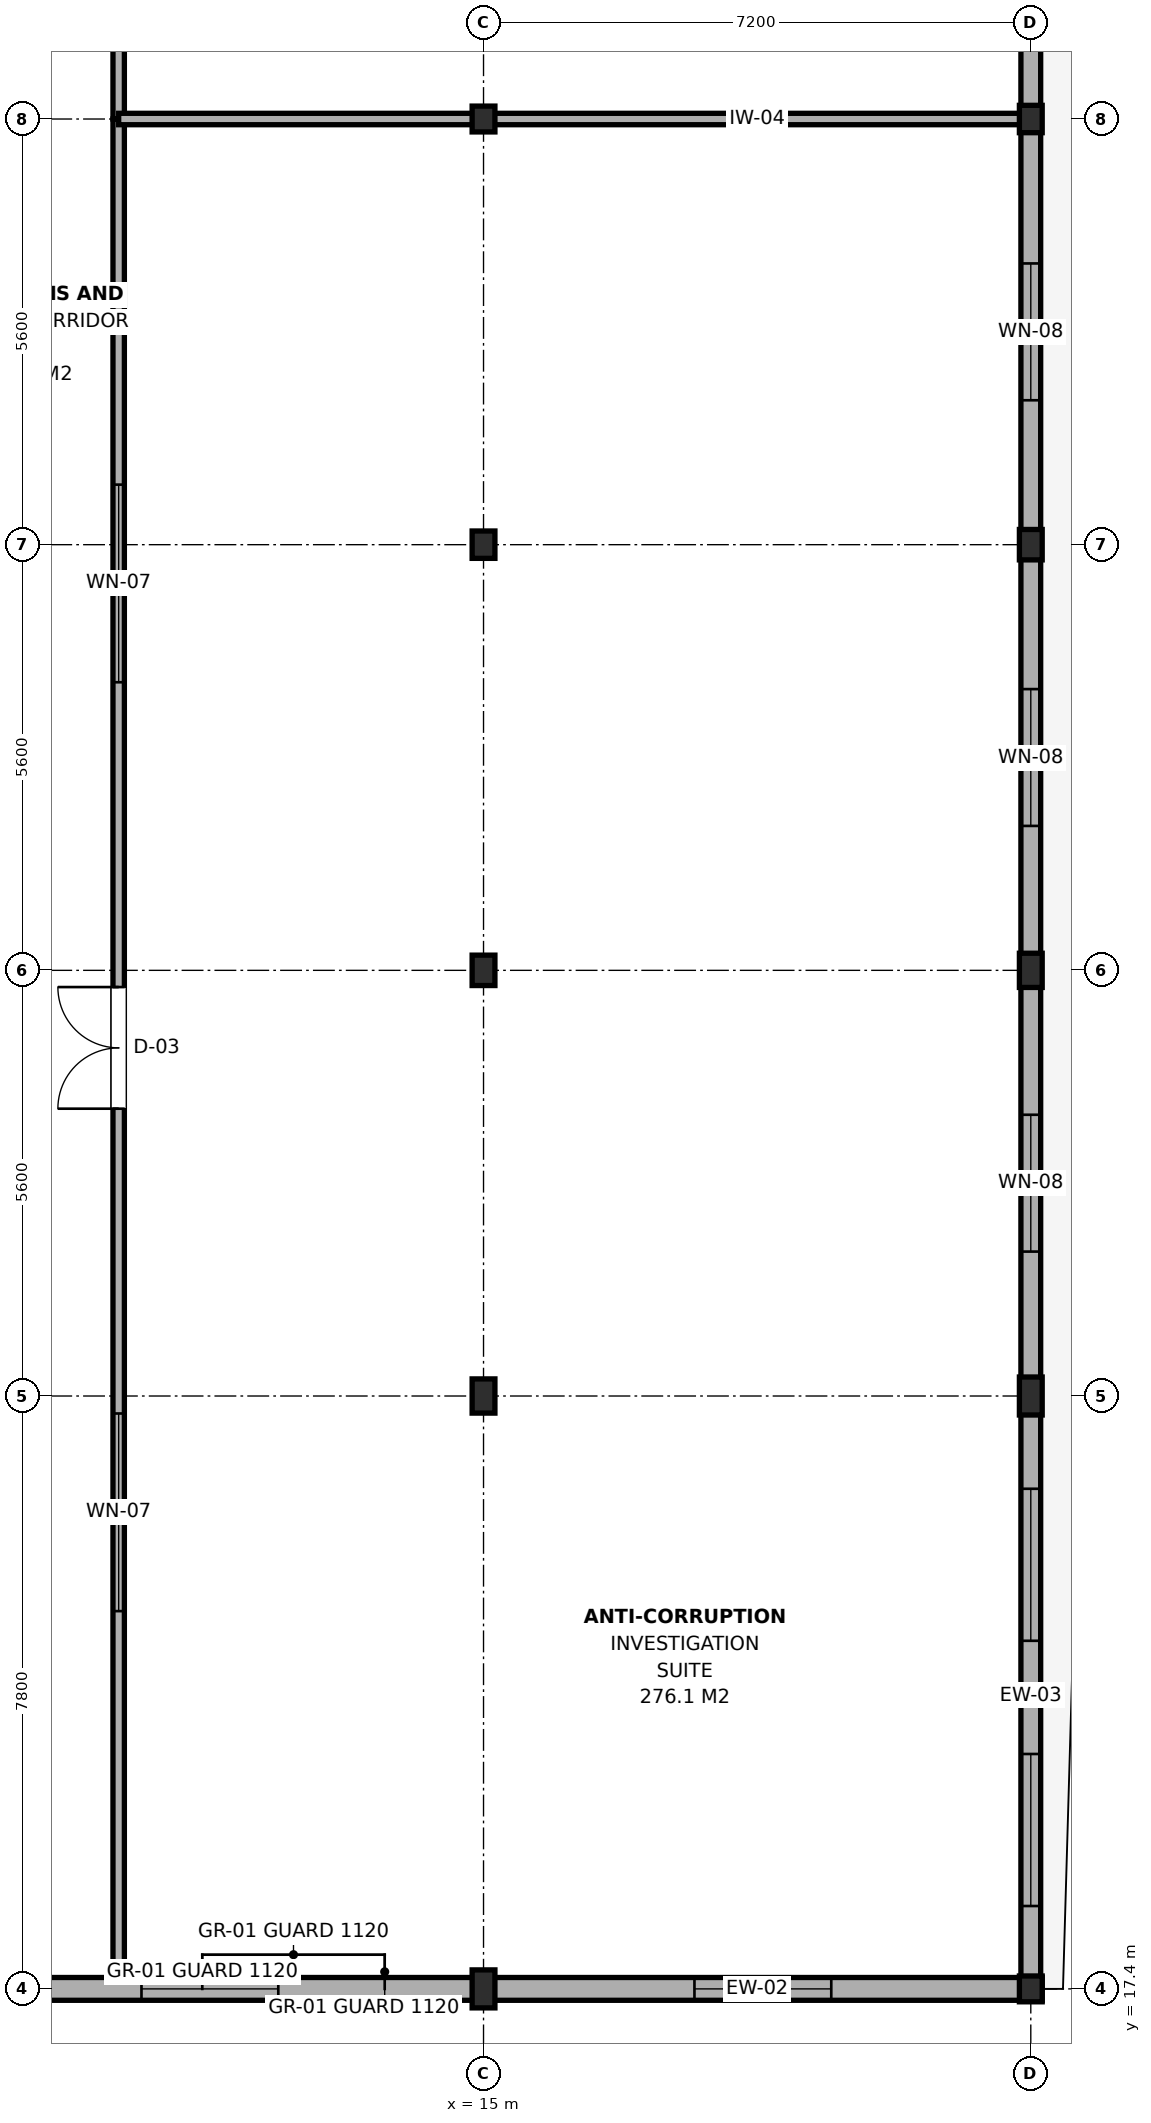
"""IFC4 building model, lengths in metres.
Left out: names, types, materials, properties, quantities, classifications, styles, units other than length and angle.
Written with IfcOpenShell. Run it as: python <this file> out.ifc"""

import sys

from ifc_helpers import new_model, si_unit, direction, frame, frame_2d, origin, origin_2d, place, context, subcontext, project, spatial, rectangle, i_section, extrude, element, fill, save


model = new_model("IFC4")
c1 = context("Model", 3, precision=1e-05, world=origin(), true_north=direction((0.0, 1.0)))
c2 = subcontext(c1, "Body", "Model", "MODEL_VIEW")
j1 = project(units=[si_unit("LENGTHUNIT", "METRE"), si_unit("PLANEANGLEUNIT", "RADIAN")], contexts=[c1])
p1 = place(None, origin())
s1 = spatial("IfcSite", under=j1, at=p1, CompositionType="ELEMENT")
p2 = place(p1, origin())
s2 = spatial("IfcBuilding", under=s1, at=p2, CompositionType="ELEMENT")
p3 = place(p2, frame((0.0, 0.0, 17.1)))
s3 = spatial("IfcBuildingStorey", under=s2, at=p3, CompositionType="ELEMENT", Elevation=17.1)
p4 = place(p3, frame((15.0, 17.4, 0.0), z_axis=(0.0, 0.0, 1.0), x_axis=(1.0, 0.0, 0.0)))
e1 = element("IfcColumn", 1, at=p4, inside=s3, PredefinedType="COLUMN", context=c2, shape_type="SweptSolid", body=[
    extrude(i_section(OverallWidth=0.3, OverallDepth=0.5, WebThickness=0.014, FlangeThickness=0.028, FilletRadius=0.027, at=origin_2d()), origin(), (0.0, 0.0, 1.0), 3.9),
])
p5 = place(p3, frame((15.0, 25.2, 0.0), z_axis=(0.0, 0.0, 1.0), x_axis=(1.0, 0.0, 0.0)))
e2 = element("IfcColumn", 2, at=p5, inside=s3, PredefinedType="COLUMN", context=c2, shape_type="SweptSolid", body=[
    extrude(i_section(OverallWidth=0.3, OverallDepth=0.45, WebThickness=0.014, FlangeThickness=0.026, FilletRadius=0.027, at=origin_2d()), origin(), (0.0, 0.0, 1.0), 3.9),
])
p6 = place(p3, frame((15.0, 30.8, 0.0), z_axis=(0.0, 0.0, 1.0), x_axis=(1.0, 0.0, 0.0)))
e3 = element("IfcColumn", 3, at=p6, inside=s3, PredefinedType="COLUMN", context=c2, shape_type="SweptSolid", body=[
    extrude(i_section(OverallWidth=0.3, OverallDepth=0.4, WebThickness=0.013, FlangeThickness=0.024, FilletRadius=0.027, at=origin_2d()), origin(), (0.0, 0.0, 1.0), 3.9),
])
p7 = place(p3, frame((15.0, 36.4, 0.0), z_axis=(0.0, 0.0, 1.0), x_axis=(1.0, 0.0, 0.0)))
e4 = element("IfcColumn", 4, at=p7, inside=s3, PredefinedType="COLUMN", context=c2, shape_type="SweptSolid", body=[
    extrude(i_section(OverallWidth=0.3, OverallDepth=0.36, WebThickness=0.012, FlangeThickness=0.022, FilletRadius=0.027, at=origin_2d()), origin(), (0.0, 0.0, 1.0), 3.9),
])
for number, where, z_axis, x_axis in (
    (5, (15.0, 42.0, 0.0), (0.0, 0.0, 1.0), (1.0, 0.0, 0.0)),
    (6, (22.2, 17.4, 0.0), (0.0, 0.0, 1.0), (1.0, 0.0, 0.0)),
):
    element("IfcColumn", number, at=place(p3, frame(where, z_axis=z_axis, x_axis=x_axis)), inside=s3, PredefinedType="COLUMN", context=c2, shape_type="SweptSolid", body=[
        extrude(i_section(OverallWidth=0.3, OverallDepth=0.34, WebThickness=0.012, FlangeThickness=0.021, FilletRadius=0.027, at=origin_2d()), origin(), (0.0, 0.0, 1.0), 3.9),
    ])
p8 = place(p3, frame((22.2, 25.2, 0.0), z_axis=(0.0, 0.0, 1.0), x_axis=(1.0, 0.0, 0.0)))
e7 = element("IfcColumn", 7, at=p8, inside=s3, PredefinedType="COLUMN", context=c2, shape_type="SweptSolid", body=[
    extrude(i_section(OverallWidth=0.3, OverallDepth=0.5, WebThickness=0.014, FlangeThickness=0.028, FilletRadius=0.027, at=origin_2d()), origin(), (0.0, 0.0, 1.0), 3.9),
])
p9 = place(p3, frame((22.2, 30.8, 0.0), z_axis=(0.0, 0.0, 1.0), x_axis=(1.0, 0.0, 0.0)))
e8 = element("IfcColumn", 8, at=p9, inside=s3, PredefinedType="COLUMN", context=c2, shape_type="SweptSolid", body=[
    extrude(i_section(OverallWidth=0.3, OverallDepth=0.45, WebThickness=0.014, FlangeThickness=0.026, FilletRadius=0.027, at=origin_2d()), origin(), (0.0, 0.0, 1.0), 3.9),
])
p10 = place(p3, frame((22.2, 36.4, 0.0), z_axis=(0.0, 0.0, 1.0), x_axis=(1.0, 0.0, 0.0)))
e9 = element("IfcColumn", 9, at=p10, inside=s3, PredefinedType="COLUMN", context=c2, shape_type="SweptSolid", body=[
    extrude(i_section(OverallWidth=0.3, OverallDepth=0.4, WebThickness=0.013, FlangeThickness=0.024, FilletRadius=0.027, at=origin_2d()), origin(), (0.0, 0.0, 1.0), 3.9),
])
p11 = place(p3, frame((22.2, 42.0, 0.0), z_axis=(0.0, 0.0, 1.0), x_axis=(1.0, 0.0, 0.0)))
e10 = element("IfcColumn", 10, at=p11, inside=s3, PredefinedType="COLUMN", context=c2, shape_type="SweptSolid", body=[
    extrude(i_section(OverallWidth=0.3, OverallDepth=0.36, WebThickness=0.012, FlangeThickness=0.022, FilletRadius=0.027, at=origin_2d()), origin(), (0.0, 0.0, 1.0), 3.9),
])
p12 = place(p3, frame((22.2, 17.27, 0.0), z_axis=(0.0, 0.0, 1.0), x_axis=(0.0, 1.0, 0.0)))
e11 = element("IfcWall", 11, at=p12, inside=s3, PredefinedType="SOLIDWALL", context=c2, shape_type="SweptSolid", body=[
    extrude(rectangle(XDim=7.93, YDim=0.26, at=frame_2d((3.965, 0.0))), origin(), (0.0, 0.0, 1.0), 3.095),
])
p13 = place(p12, frame((1.22, 0.0, 0.65)))
e12 = element("IfcOpeningElement", 12, at=p13, cuts=e11, PredefinedType="OPENING", context=c2, shape_type="SweptSolid", body=[
    extrude(rectangle(XDim=2.0, YDim=1.8, at=frame_2d((1.0, 0.9))), frame((0.0, 0.145, 0.0), z_axis=(0.0, -1.0, 0.0), x_axis=(1.0, 0.0, 0.0)), (0.0, 0.0, 1.0), 0.29),
])
p14 = place(p12, frame((4.71, 0.0, 0.65)))
e13 = element("IfcOpeningElement", 13, at=p14, cuts=e11, PredefinedType="OPENING", context=c2, shape_type="SweptSolid", body=[
    extrude(rectangle(XDim=2.0, YDim=1.8, at=frame_2d((1.0, 0.9))), frame((0.0, 0.145, 0.0), z_axis=(0.0, -1.0, 0.0), x_axis=(1.0, 0.0, 0.0)), (0.0, 0.0, 1.0), 0.29),
])
p15 = place(p3, frame((22.2, 25.2, 0.0), z_axis=(0.0, 0.0, 1.0), x_axis=(0.0, 1.0, 0.0)))
e14 = element("IfcWall", 14, at=p15, inside=s3, PredefinedType="SOLIDWALL", context=c2, shape_type="SweptSolid", body=[
    extrude(rectangle(XDim=5.6, YDim=0.26, at=frame_2d((2.8, 0.0))), origin(), (0.0, 0.0, 1.0), 3.095),
])
p16 = place(p15, frame((1.9, 0.0, 0.65)))
e15 = element("IfcOpeningElement", 15, at=p16, cuts=e14, PredefinedType="OPENING", context=c2, shape_type="SweptSolid", body=[
    extrude(rectangle(XDim=1.8, YDim=1.2, at=frame_2d((0.9, 0.6))), frame((0.0, 0.145, 0.0), z_axis=(0.0, -1.0, 0.0), x_axis=(1.0, 0.0, 0.0)), (0.0, 0.0, 1.0), 0.29),
])
p17 = place(p3, frame((22.2, 30.8, 0.0), z_axis=(0.0, 0.0, 1.0), x_axis=(0.0, 1.0, 0.0)))
e16 = element("IfcWall", 16, at=p17, inside=s3, PredefinedType="SOLIDWALL", context=c2, shape_type="SweptSolid", body=[
    extrude(rectangle(XDim=5.6, YDim=0.26, at=frame_2d((2.8, 0.0))), origin(), (0.0, 0.0, 1.0), 3.095),
])
p18 = place(p17, frame((1.9, 0.0, 0.65)))
e17 = element("IfcOpeningElement", 17, at=p18, cuts=e16, PredefinedType="OPENING", context=c2, shape_type="SweptSolid", body=[
    extrude(rectangle(XDim=1.8, YDim=1.2, at=frame_2d((0.9, 0.6))), frame((0.0, 0.145, 0.0), z_axis=(0.0, -1.0, 0.0), x_axis=(1.0, 0.0, 0.0)), (0.0, 0.0, 1.0), 0.29),
])
p19 = place(p3, frame((22.2, 36.4, 0.0), z_axis=(0.0, 0.0, 1.0), x_axis=(0.0, 1.0, 0.0)))
e18 = element("IfcWall", 18, at=p19, inside=s3, PredefinedType="SOLIDWALL", context=c2, shape_type="SweptSolid", body=[
    extrude(rectangle(XDim=5.6, YDim=0.26, at=frame_2d((2.8, 0.0))), origin(), (0.0, 0.0, 1.0), 3.145),
])
p20 = place(p19, frame((1.9, 0.0, 0.65)))
e19 = element("IfcOpeningElement", 19, at=p20, cuts=e18, PredefinedType="OPENING", context=c2, shape_type="SweptSolid", body=[
    extrude(rectangle(XDim=1.8, YDim=1.2, at=frame_2d((0.9, 0.6))), frame((0.0, 0.145, 0.0), z_axis=(0.0, -1.0, 0.0), x_axis=(1.0, 0.0, 0.0)), (0.0, 0.0, 1.0), 0.29),
])
p21 = place(p3, frame((22.2, 42.0, 0.0), z_axis=(0.0, 0.0, 1.0), x_axis=(0.0, 1.0, 0.0)))
e20 = element("IfcWall", 20, at=p21, inside=s3, PredefinedType="SOLIDWALL", context=c2, shape_type="SweptSolid", body=[
    extrude(rectangle(XDim=5.6, YDim=0.26, at=frame_2d((2.8, 0.0))), origin(), (0.0, 0.0, 1.0), 3.195),
])
p22 = place(p21, frame((1.6, 0.0, 0.9)))
e21 = element("IfcOpeningElement", 21, at=p22, cuts=e20, PredefinedType="OPENING", context=c2, shape_type="SweptSolid", body=[
    extrude(rectangle(XDim=2.4, YDim=2.1, at=frame_2d((1.2, 1.05))), frame((0.0, 0.145, 0.0), z_axis=(0.0, -1.0, 0.0), x_axis=(1.0, 0.0, 0.0)), (0.0, 0.0, 1.0), 0.29),
])
p23 = place(p3, frame((7.8, 17.4, 0.0), z_axis=(0.0, 0.0, 1.0), x_axis=(1.0, 0.0, 0.0)))
e22 = element("IfcWall", 22, at=p23, inside=s3, PredefinedType="SOLIDWALL", context=c2, shape_type="SweptSolid", body=[
    extrude(rectangle(XDim=7.2, YDim=0.3, at=frame_2d((3.6, 0.0))), origin(), (0.0, 0.0, 1.0), 3.095),
])
p24 = place(p23, frame((2.7, 0.0, 0.65)))
e23 = element("IfcOpeningElement", 23, at=p24, cuts=e22, PredefinedType="OPENING", context=c2, shape_type="SweptSolid", body=[
    extrude(rectangle(XDim=1.8, YDim=1.2, at=frame_2d((0.9, 0.6))), frame((0.0, 0.165, 0.0), z_axis=(0.0, -1.0, 0.0), x_axis=(1.0, 0.0, 0.0)), (0.0, 0.0, 1.0), 0.33),
])
p25 = place(p3, frame((15.0, 17.4, 0.0), z_axis=(0.0, 0.0, 1.0), x_axis=(1.0, 0.0, 0.0)))
e24 = element("IfcWall", 24, at=p25, inside=s3, PredefinedType="SOLIDWALL", context=c2, shape_type="SweptSolid", body=[
    extrude(rectangle(XDim=7.35, YDim=0.3, at=frame_2d((3.675, 0.0))), origin(), (0.0, 0.0, 1.0), 3.095),
])
p26 = place(p25, frame((2.775, 0.0, 0.65)))
e25 = element("IfcOpeningElement", 25, at=p26, cuts=e24, PredefinedType="OPENING", context=c2, shape_type="SweptSolid", body=[
    extrude(rectangle(XDim=1.8, YDim=1.2, at=frame_2d((0.9, 0.6))), frame((0.0, 0.165, 0.0), z_axis=(0.0, -1.0, 0.0), x_axis=(1.0, 0.0, 0.0)), (0.0, 0.0, 1.0), 0.33),
])
p27 = place(p3, frame((10.2, 17.56, 0.0), z_axis=(0.0, 0.0, 1.0), x_axis=(0.0, 1.0, 0.0)))
e26 = element("IfcWall", 26, at=p27, inside=s3, PredefinedType="PARTITIONING", context=c2, shape_type="SweptSolid", body=[
    extrude(rectangle(XDim=24.44, YDim=0.15, at=frame_2d((12.22, 0.0))), origin(), (0.0, 0.0, 1.0), 3.095),
])
p28 = place(p27, frame((11.42, 0.0, 0.0)))
e27 = element("IfcOpeningElement", 27, at=p28, cuts=e26, PredefinedType="OPENING", context=c2, shape_type="SweptSolid", body=[
    extrude(rectangle(XDim=1.6, YDim=2.15, at=frame_2d((0.8, 1.075))), frame((0.0, 0.09, 0.0), z_axis=(0.0, -1.0, 0.0), x_axis=(1.0, 0.0, 0.0)), (0.0, 0.0, 1.0), 0.18),
])
p29 = place(p27, frame((4.81, 0.0, 0.95)))
e28 = element("IfcOpeningElement", 28, at=p29, cuts=e26, PredefinedType="OPENING", context=c2, shape_type="SweptSolid", body=[
    extrude(rectangle(XDim=2.6, YDim=1.5, at=frame_2d((1.3, 0.75))), frame((0.0, 0.09, 0.0), z_axis=(0.0, -1.0, 0.0), x_axis=(1.0, 0.0, 0.0)), (0.0, 0.0, 1.0), 0.18),
])
p30 = place(p27, frame((17.03, 0.0, 0.95)))
e29 = element("IfcOpeningElement", 29, at=p30, cuts=e26, PredefinedType="OPENING", context=c2, shape_type="SweptSolid", body=[
    extrude(rectangle(XDim=2.6, YDim=1.5, at=frame_2d((1.3, 0.75))), frame((0.0, 0.09, 0.0), z_axis=(0.0, -1.0, 0.0), x_axis=(1.0, 0.0, 0.0)), (0.0, 0.0, 1.0), 0.18),
])
p31 = place(p3, frame((10.2, 42.0, 0.0), z_axis=(0.0, 0.0, 1.0), x_axis=(0.0, 1.0, 0.0)))
e30 = element("IfcWall", 30, at=p31, inside=s3, PredefinedType="PARTITIONING", context=c2, shape_type="SweptSolid", body=[
    extrude(rectangle(XDim=31.8, YDim=0.15, at=frame_2d((15.9, 0.0))), origin(), (0.0, 0.0, 1.0), 3.195),
])
p32 = place(p31, frame((15.1, 0.0, 0.0)))
e31 = element("IfcOpeningElement", 31, at=p32, cuts=e30, PredefinedType="OPENING", context=c2, shape_type="SweptSolid", body=[
    extrude(rectangle(XDim=1.6, YDim=2.15, at=frame_2d((0.8, 1.075))), frame((0.0, 0.09, 0.0), z_axis=(0.0, -1.0, 0.0), x_axis=(1.0, 0.0, 0.0)), (0.0, 0.0, 1.0), 0.18),
])
p33 = place(p31, frame((6.65, 0.0, 0.95)))
e32 = element("IfcOpeningElement", 32, at=p33, cuts=e30, PredefinedType="OPENING", context=c2, shape_type="SweptSolid", body=[
    extrude(rectangle(XDim=2.6, YDim=1.5, at=frame_2d((1.3, 0.75))), frame((0.0, 0.09, 0.0), z_axis=(0.0, -1.0, 0.0), x_axis=(1.0, 0.0, 0.0)), (0.0, 0.0, 1.0), 0.18),
])
p34 = place(p31, frame((22.55, 0.0, 0.95)))
e33 = element("IfcOpeningElement", 33, at=p34, cuts=e30, PredefinedType="OPENING", context=c2, shape_type="SweptSolid", body=[
    extrude(rectangle(XDim=2.6, YDim=1.5, at=frame_2d((1.3, 0.75))), frame((0.0, 0.09, 0.0), z_axis=(0.0, -1.0, 0.0), x_axis=(1.0, 0.0, 0.0)), (0.0, 0.0, 1.0), 0.18),
])
p35 = place(p3, frame((10.2, 42.0, 0.0), z_axis=(0.0, 0.0, 1.0), x_axis=(1.0, 0.0, 0.0)))
e34 = element("IfcWall", 34, at=p35, inside=s3, PredefinedType="PARTITIONING", context=c2, shape_type="SweptSolid", body=[
    extrude(rectangle(XDim=11.86, YDim=0.15, at=frame_2d((5.93, 0.0))), origin(), (0.0, 0.0, 1.0), 3.095),
])
p36 = place(p13, origin())
e35 = element("IfcWindow", 35, at=p36, inside=s3, PartitioningType="SINGLE_PANEL", PredefinedType="WINDOW", context=c2, shape_type="SweptSolid", body=[
    extrude(rectangle(XDim=2.0, YDim=1.8, at=frame_2d((1.0, 0.9))), frame((0.0, 0.03, 0.0), z_axis=(0.0, -1.0, 0.0), x_axis=(1.0, 0.0, 0.0)), (0.0, 0.0, 1.0), 0.06),
])
fill(e12, e35)
p37 = place(p14, origin())
e36 = element("IfcWindow", 36, at=p37, inside=s3, PartitioningType="SINGLE_PANEL", PredefinedType="WINDOW", context=c2, shape_type="SweptSolid", body=[
    extrude(rectangle(XDim=2.0, YDim=1.8, at=frame_2d((1.0, 0.9))), frame((0.0, 0.03, 0.0), z_axis=(0.0, -1.0, 0.0), x_axis=(1.0, 0.0, 0.0)), (0.0, 0.0, 1.0), 0.06),
])
fill(e13, e36)
p38 = place(p16, origin())
e37 = element("IfcWindow", 37, at=p38, inside=s3, PartitioningType="SINGLE_PANEL", PredefinedType="WINDOW", context=c2, shape_type="SweptSolid", body=[
    extrude(rectangle(XDim=1.8, YDim=1.2, at=frame_2d((0.9, 0.6))), frame((0.0, 0.03, 0.0), z_axis=(0.0, -1.0, 0.0), x_axis=(1.0, 0.0, 0.0)), (0.0, 0.0, 1.0), 0.06),
])
fill(e15, e37)
p39 = place(p18, origin())
e38 = element("IfcWindow", 38, at=p39, inside=s3, PartitioningType="SINGLE_PANEL", PredefinedType="WINDOW", context=c2, shape_type="SweptSolid", body=[
    extrude(rectangle(XDim=1.8, YDim=1.2, at=frame_2d((0.9, 0.6))), frame((0.0, 0.03, 0.0), z_axis=(0.0, -1.0, 0.0), x_axis=(1.0, 0.0, 0.0)), (0.0, 0.0, 1.0), 0.06),
])
fill(e17, e38)
p40 = place(p20, origin())
e39 = element("IfcWindow", 39, at=p40, inside=s3, PartitioningType="SINGLE_PANEL", PredefinedType="WINDOW", context=c2, shape_type="SweptSolid", body=[
    extrude(rectangle(XDim=1.8, YDim=1.2, at=frame_2d((0.9, 0.6))), frame((0.0, 0.03, 0.0), z_axis=(0.0, -1.0, 0.0), x_axis=(1.0, 0.0, 0.0)), (0.0, 0.0, 1.0), 0.06),
])
fill(e19, e39)
p41 = place(p24, origin())
e40 = element("IfcWindow", 40, at=p41, inside=s3, PartitioningType="SINGLE_PANEL", PredefinedType="WINDOW", context=c2, shape_type="SweptSolid", body=[
    extrude(rectangle(XDim=1.8, YDim=1.2, at=frame_2d((0.9, 0.6))), frame((0.0, 0.03, 0.0), z_axis=(0.0, -1.0, 0.0), x_axis=(1.0, 0.0, 0.0)), (0.0, 0.0, 1.0), 0.06),
])
fill(e23, e40)
p42 = place(p26, origin())
e41 = element("IfcWindow", 41, at=p42, inside=s3, PartitioningType="SINGLE_PANEL", PredefinedType="WINDOW", context=c2, shape_type="SweptSolid", body=[
    extrude(rectangle(XDim=1.8, YDim=1.2, at=frame_2d((0.9, 0.6))), frame((0.0, 0.03, 0.0), z_axis=(0.0, -1.0, 0.0), x_axis=(1.0, 0.0, 0.0)), (0.0, 0.0, 1.0), 0.06),
])
fill(e25, e41)
p43 = place(p28, origin())
e42 = element("IfcDoor", 42, at=p43, inside=s3, OperationType="DOUBLE_DOOR_SINGLE_SWING", PredefinedType="DOOR", context=c2, shape_type="SweptSolid", body=[
    extrude(rectangle(XDim=1.6, YDim=2.15, at=frame_2d((0.8, 1.075))), frame((0.0, 0.025, 0.0), z_axis=(0.0, -1.0, 0.0), x_axis=(1.0, 0.0, 0.0)), (0.0, 0.0, 1.0), 0.05),
])
fill(e27, e42)
p44 = place(p29, origin())
e43 = element("IfcWindow", 43, at=p44, inside=s3, PartitioningType="SINGLE_PANEL", PredefinedType="WINDOW", context=c2, shape_type="SweptSolid", body=[
    extrude(rectangle(XDim=2.6, YDim=1.5, at=frame_2d((1.3, 0.75))), frame((0.0, 0.03, 0.0), z_axis=(0.0, -1.0, 0.0), x_axis=(1.0, 0.0, 0.0)), (0.0, 0.0, 1.0), 0.06),
])
fill(e28, e43)
p45 = place(p30, origin())
e44 = element("IfcWindow", 44, at=p45, inside=s3, PartitioningType="SINGLE_PANEL", PredefinedType="WINDOW", context=c2, shape_type="SweptSolid", body=[
    extrude(rectangle(XDim=2.6, YDim=1.5, at=frame_2d((1.3, 0.75))), frame((0.0, 0.03, 0.0), z_axis=(0.0, -1.0, 0.0), x_axis=(1.0, 0.0, 0.0)), (0.0, 0.0, 1.0), 0.06),
])
fill(e29, e44)
save(model, sys.argv[1])
